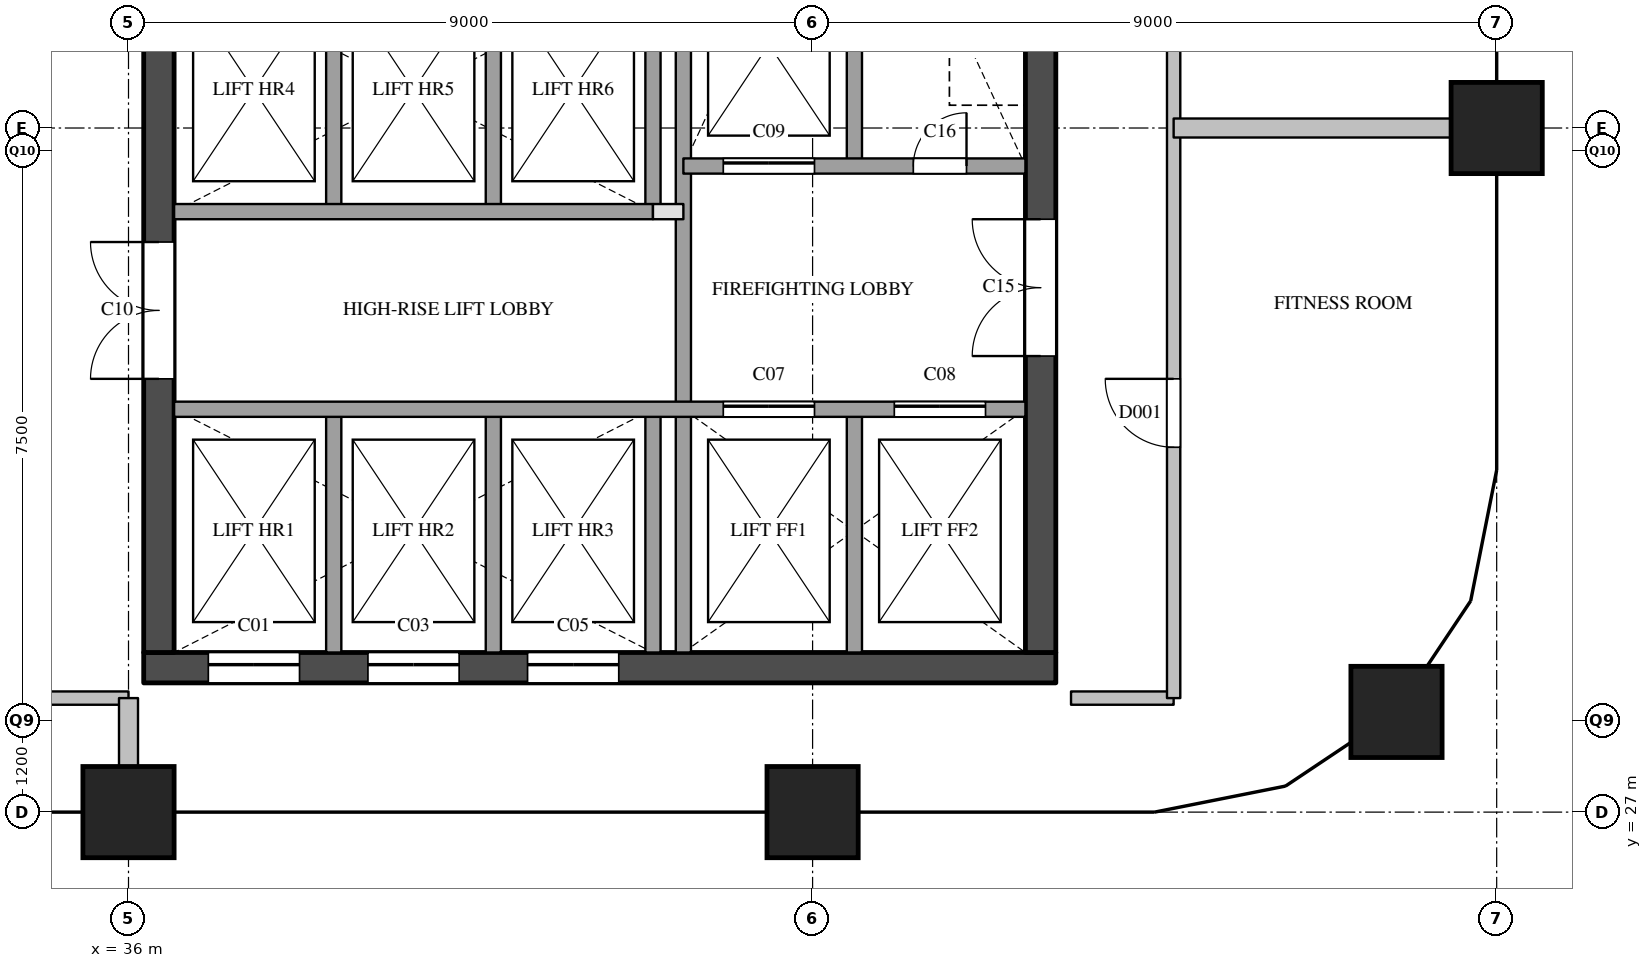
"""IFC4 building model, lengths in metres.
Left out: names, types, materials, properties, quantities, classifications, styles, units other than length and angle.
Written with IfcOpenShell. Run it as: python <this file> out.ifc"""

import sys

from ifc_helpers import new_model, si_unit, direction, frame, frame_2d, origin, origin_2d, place, context, subcontext, project, spatial, rectangle, extrude, element, fill, save


model = new_model("IFC4")
c1 = context("Model", 3, precision=1e-05, world=origin(), true_north=direction((0.0, 1.0)))
c2 = subcontext(c1, "Body", "Model", "MODEL_VIEW")
j1 = project(units=[si_unit("LENGTHUNIT", "METRE"), si_unit("PLANEANGLEUNIT", "RADIAN")], contexts=[c1])
p1 = place(None, origin())
s1 = spatial("IfcSite", under=j1, at=p1, CompositionType="ELEMENT")
p2 = place(p1, origin())
s2 = spatial("IfcBuilding", under=s1, at=p2, CompositionType="ELEMENT")
p3 = place(p2, frame((0.0, 0.0, 281.3)))
s3 = spatial("IfcBuildingStorey", under=s2, at=p3, CompositionType="ELEMENT", Elevation=281.3)
for number, where, z_axis, x_axis in (
    (1, (36.0, 27.0, 0.0), (0.0, 0.0, 1.0), (1.0, 0.0, 0.0)),
    (2, (45.0, 27.0, 0.0), (0.0, 0.0, 1.0), (1.0, 0.0, 0.0)),
    (3, (52.682, 28.318, 0.0), (0.0, 0.0, 1.0), (1.0, 0.0, 0.0)),
    (4, (54.0, 36.0, 0.0), (0.0, 0.0, 1.0), (1.0, 0.0, 0.0)),
):
    element("IfcColumn", number, at=place(p3, frame(where, z_axis=z_axis, x_axis=x_axis)), inside=s3, PredefinedType="COLUMN", context=c2, shape_type="SweptSolid", body=[
        extrude(rectangle(XDim=1.2, YDim=1.2, at=origin_2d()), origin(), (0.0, 0.0, 1.0), 3.9),
    ])
p4 = place(p3, frame((36.2, 28.9, 0.0), z_axis=(0.0, 0.0, 1.0), x_axis=(1.0, 0.0, 0.0)))
e5 = element("IfcWall", 5, at=p4, inside=s3, PredefinedType="SHEAR", context=c2, shape_type="SweptSolid", body=[
    extrude(rectangle(XDim=12.0, YDim=0.4, at=frame_2d((6.0, 0.0))), origin(), (0.0, 0.0, 1.0), 3.6),
])
p5 = place(p4, frame((0.85, 0.0, 0.0)))
e6 = element("IfcOpeningElement", 6, at=p5, cuts=e5, PredefinedType="OPENING", context=c2, shape_type="SweptSolid", body=[
    extrude(rectangle(XDim=1.2, YDim=2.1, at=frame_2d((0.6, 1.05))), frame((0.0, 0.21, 0.0), z_axis=(0.0, -1.0, 0.0), x_axis=(1.0, 0.0, 0.0)), (0.0, 0.0, 1.0), 0.42),
])
p6 = place(p4, frame((2.95, 0.0, 0.0)))
e7 = element("IfcOpeningElement", 7, at=p6, cuts=e5, PredefinedType="OPENING", context=c2, shape_type="SweptSolid", body=[
    extrude(rectangle(XDim=1.2, YDim=2.1, at=frame_2d((0.6, 1.05))), frame((0.0, 0.21, 0.0), z_axis=(0.0, -1.0, 0.0), x_axis=(1.0, 0.0, 0.0)), (0.0, 0.0, 1.0), 0.42),
])
p7 = place(p4, frame((5.05, 0.0, 0.0)))
e8 = element("IfcOpeningElement", 8, at=p7, cuts=e5, PredefinedType="OPENING", context=c2, shape_type="SweptSolid", body=[
    extrude(rectangle(XDim=1.2, YDim=2.1, at=frame_2d((0.6, 1.05))), frame((0.0, 0.21, 0.0), z_axis=(0.0, -1.0, 0.0), x_axis=(1.0, 0.0, 0.0)), (0.0, 0.0, 1.0), 0.42),
])
p8 = place(p3, frame((36.4, 29.1, 0.0), z_axis=(0.0, 0.0, 1.0), x_axis=(0.0, 1.0, 0.0)))
e9 = element("IfcWall", 9, at=p8, inside=s3, PredefinedType="SHEAR", context=c2, shape_type="SweptSolid", body=[
    extrude(rectangle(XDim=20.3, YDim=0.4, at=frame_2d((10.15, 0.0))), origin(), (0.0, 0.0, 1.0), 3.6),
])
p9 = place(p8, frame((3.6, 0.0, 0.0)))
e10 = element("IfcOpeningElement", 10, at=p9, cuts=e9, PredefinedType="OPENING", context=c2, shape_type="SweptSolid", body=[
    extrude(rectangle(XDim=1.8, YDim=2.1, at=frame_2d((0.9, 1.05))), frame((0.0, 0.21, 0.0), z_axis=(0.0, -1.0, 0.0), x_axis=(1.0, 0.0, 0.0)), (0.0, 0.0, 1.0), 0.42),
])
p10 = place(p8, frame((16.4, 0.0, 0.0)))
e11 = element("IfcOpeningElement", 11, at=p10, cuts=e9, PredefinedType="OPENING", context=c2, shape_type="SweptSolid", body=[
    extrude(rectangle(XDim=1.0, YDim=2.1, at=frame_2d((0.5, 1.05))), frame((0.0, 0.21, 0.0), z_axis=(0.0, -1.0, 0.0), x_axis=(1.0, 0.0, 0.0)), (0.0, 0.0, 1.0), 0.42),
])
p11 = place(p3, frame((48.0, 29.1, 0.0), z_axis=(0.0, 0.0, 1.0), x_axis=(0.0, 1.0, 0.0)))
e12 = element("IfcWall", 12, at=p11, inside=s3, PredefinedType="SHEAR", context=c2, shape_type="SweptSolid", body=[
    extrude(rectangle(XDim=20.3, YDim=0.4, at=frame_2d((10.15, 0.0))), origin(), (0.0, 0.0, 1.0), 3.6),
])
p12 = place(p11, frame((12.5, 0.0, 0.0)))
e13 = element("IfcOpeningElement", 13, at=p12, cuts=e12, PredefinedType="OPENING", context=c2, shape_type="SweptSolid", body=[
    extrude(rectangle(XDim=0.7, YDim=2.1, at=frame_2d((0.35, 1.05))), frame((0.0, 0.21, 0.0), z_axis=(0.0, -1.0, 0.0), x_axis=(1.0, 0.0, 0.0)), (0.0, 0.0, 1.0), 0.42),
])
p13 = place(p11, frame((3.9, 0.0, 0.0)))
e14 = element("IfcOpeningElement", 14, at=p13, cuts=e12, PredefinedType="OPENING", context=c2, shape_type="SweptSolid", body=[
    extrude(rectangle(XDim=1.8, YDim=2.1, at=frame_2d((0.9, 1.05))), frame((0.0, 0.21, 0.0), z_axis=(0.0, -1.0, 0.0), x_axis=(1.0, 0.0, 0.0)), (0.0, 0.0, 1.0), 0.42),
])
p14 = place(p3, frame((38.7, 29.1, 0.0), z_axis=(0.0, 0.0, 1.0), x_axis=(0.0, 1.0, 0.0)))
e15 = element("IfcWall", 15, at=p14, inside=s3, PredefinedType="SOLIDWALL", context=c2, shape_type="SweptSolid", body=[
    extrude(rectangle(XDim=3.2, YDim=0.2, at=frame_2d((1.6, 0.0))), origin(), (0.0, 0.0, 1.0), 3.6),
])
p15 = place(p3, frame((38.7, 34.9, 0.0), z_axis=(0.0, 0.0, 1.0), x_axis=(0.0, 1.0, 0.0)))
e16 = element("IfcWall", 16, at=p15, inside=s3, PredefinedType="SOLIDWALL", context=c2, shape_type="SweptSolid", body=[
    extrude(rectangle(XDim=3.2, YDim=0.2, at=frame_2d((1.6, 0.0))), origin(), (0.0, 0.0, 1.0), 3.6),
])
p16 = place(p3, frame((40.8, 29.1, 0.0), z_axis=(0.0, 0.0, 1.0), x_axis=(0.0, 1.0, 0.0)))
e17 = element("IfcWall", 17, at=p16, inside=s3, PredefinedType="SOLIDWALL", context=c2, shape_type="SweptSolid", body=[
    extrude(rectangle(XDim=3.2, YDim=0.2, at=frame_2d((1.6, 0.0))), origin(), (0.0, 0.0, 1.0), 3.6),
])
p17 = place(p3, frame((40.8, 34.9, 0.0), z_axis=(0.0, 0.0, 1.0), x_axis=(0.0, 1.0, 0.0)))
e18 = element("IfcWall", 18, at=p17, inside=s3, PredefinedType="SOLIDWALL", context=c2, shape_type="SweptSolid", body=[
    extrude(rectangle(XDim=3.2, YDim=0.2, at=frame_2d((1.6, 0.0))), origin(), (0.0, 0.0, 1.0), 3.6),
])
p18 = place(p3, frame((42.9, 29.1, 0.0), z_axis=(0.0, 0.0, 1.0), x_axis=(0.0, 1.0, 0.0)))
e19 = element("IfcWall", 19, at=p18, inside=s3, PredefinedType="SOLIDWALL", context=c2, shape_type="SweptSolid", body=[
    extrude(rectangle(XDim=3.2, YDim=0.2, at=frame_2d((1.6, 0.0))), origin(), (0.0, 0.0, 1.0), 3.6),
])
p19 = place(p3, frame((42.9, 34.9, 0.0), z_axis=(0.0, 0.0, 1.0), x_axis=(0.0, 1.0, 0.0)))
e20 = element("IfcWall", 20, at=p19, inside=s3, PredefinedType="SOLIDWALL", context=c2, shape_type="SweptSolid", body=[
    extrude(rectangle(XDim=3.2, YDim=0.2, at=frame_2d((1.6, 0.0))), origin(), (0.0, 0.0, 1.0), 3.6),
])
p20 = place(p3, frame((43.3, 29.1, 0.0), z_axis=(0.0, 0.0, 1.0), x_axis=(0.0, 1.0, 0.0)))
e21 = element("IfcWall", 21, at=p20, inside=s3, PredefinedType="SOLIDWALL", context=c2, shape_type="SweptSolid", body=[
    extrude(rectangle(XDim=9.9, YDim=0.2, at=frame_2d((4.95, 0.0))), origin(), (0.0, 0.0, 1.0), 3.6),
])
for number, where, z_axis, x_axis in (
    (22, (45.55, 29.1, 0.0), (0.0, 0.0, 1.0), (0.0, 1.0, 0.0)),
    (23, (45.55, 35.5, 0.0), (0.0, 0.0, 1.0), (0.0, 1.0, 0.0)),
):
    element("IfcWall", number, at=place(p3, frame(where, z_axis=z_axis, x_axis=x_axis)), inside=s3, PredefinedType="SOLIDWALL", context=c2, shape_type="SweptSolid", body=[
        extrude(rectangle(XDim=3.2, YDim=0.2, at=frame_2d((1.6, 0.0))), origin(), (0.0, 0.0, 1.0), 3.6),
    ])
p21 = place(p3, frame((36.6, 32.3, 0.0), z_axis=(0.0, 0.0, 1.0), x_axis=(1.0, 0.0, 0.0)))
e24 = element("IfcWall", 24, at=p21, inside=s3, PredefinedType="SOLIDWALL", context=c2, shape_type="SweptSolid", body=[
    extrude(rectangle(XDim=11.2, YDim=0.2, at=frame_2d((5.6, 0.0))), origin(), (0.0, 0.0, 1.0), 3.6),
])
p22 = place(p21, frame((7.225, 0.0, 0.0)))
e25 = element("IfcOpeningElement", 25, at=p22, cuts=e24, PredefinedType="OPENING", context=c2, shape_type="SweptSolid", body=[
    extrude(rectangle(XDim=1.2, YDim=2.1, at=frame_2d((0.6, 1.05))), frame((0.0, 0.11, 0.0), z_axis=(0.0, -1.0, 0.0), x_axis=(1.0, 0.0, 0.0)), (0.0, 0.0, 1.0), 0.22),
])
p23 = place(p21, frame((9.475, 0.0, 0.0)))
e26 = element("IfcOpeningElement", 26, at=p23, cuts=e24, PredefinedType="OPENING", context=c2, shape_type="SweptSolid", body=[
    extrude(rectangle(XDim=1.2, YDim=2.1, at=frame_2d((0.6, 1.05))), frame((0.0, 0.11, 0.0), z_axis=(0.0, -1.0, 0.0), x_axis=(1.0, 0.0, 0.0)), (0.0, 0.0, 1.0), 0.22),
])
p24 = place(p3, frame((42.9, 34.9, 0.0), z_axis=(0.0, 0.0, 1.0), x_axis=(1.0, 0.0, 0.0)))
e27 = element("IfcWall", 27, at=p24, inside=s3, PredefinedType="PARTITIONING", context=c2, shape_type="SweptSolid", body=[
    extrude(rectangle(XDim=0.4, YDim=0.2, at=frame_2d((0.2, 0.0))), origin(), (0.0, 0.0, 1.0), 3.6),
])
p25 = place(p3, frame((36.6, 34.9, 0.0), z_axis=(0.0, 0.0, 1.0), x_axis=(1.0, 0.0, 0.0)))
e28 = element("IfcWall", 28, at=p25, inside=s3, PredefinedType="SOLIDWALL", context=c2, shape_type="SweptSolid", body=[
    extrude(rectangle(XDim=6.3, YDim=0.2, at=frame_2d((3.15, 0.0))), origin(), (0.0, 0.0, 1.0), 3.6),
])
p26 = place(p3, frame((43.3, 35.5, 0.0), z_axis=(0.0, 0.0, 1.0), x_axis=(1.0, 0.0, 0.0)))
e29 = element("IfcWall", 29, at=p26, inside=s3, PredefinedType="SOLIDWALL", context=c2, shape_type="SweptSolid", body=[
    extrude(rectangle(XDim=4.5, YDim=0.2, at=frame_2d((2.25, 0.0))), origin(), (0.0, 0.0, 1.0), 3.6),
])
p27 = place(p26, frame((0.525, 0.0, 0.0)))
e30 = element("IfcOpeningElement", 30, at=p27, cuts=e29, PredefinedType="OPENING", context=c2, shape_type="SweptSolid", body=[
    extrude(rectangle(XDim=1.2, YDim=2.1, at=frame_2d((0.6, 1.05))), frame((0.0, 0.11, 0.0), z_axis=(0.0, -1.0, 0.0), x_axis=(1.0, 0.0, 0.0)), (0.0, 0.0, 1.0), 0.22),
])
p28 = place(p26, frame((3.025, 0.0, 0.0)))
e31 = element("IfcOpeningElement", 31, at=p28, cuts=e29, PredefinedType="OPENING", context=c2, shape_type="SweptSolid", body=[
    extrude(rectangle(XDim=0.7, YDim=2.1, at=frame_2d((0.35, 1.05))), frame((0.0, 0.11, 0.0), z_axis=(0.0, -1.0, 0.0), x_axis=(1.0, 0.0, 0.0)), (0.0, 0.0, 1.0), 0.22),
])
for number, where, z_axis, x_axis in (
    (32, (34.65, 28.5, 0.0), (0.0, 0.0, 1.0), (1.0, 0.0, 0.0)),
    (33, (48.4, 28.5, 0.0), (0.0, 0.0, 1.0), (1.0, 0.0, 0.0)),
):
    element("IfcWall", number, at=place(p3, frame(where, z_axis=z_axis, x_axis=x_axis)), inside=s3, PredefinedType="PARTITIONING", context=c2, shape_type="SweptSolid", body=[
        extrude(rectangle(XDim=1.35, YDim=0.175, at=frame_2d((0.675, 0.0))), origin(), (0.0, 0.0, 1.0), 3.6),
    ])
p29 = place(p3, frame((49.75, 28.5, 0.0), z_axis=(0.0, 0.0, 1.0), x_axis=(0.0, 1.0, 0.0)))
e34 = element("IfcWall", 34, at=p29, inside=s3, PredefinedType="PARTITIONING", context=c2, shape_type="SweptSolid", body=[
    extrude(rectangle(XDim=22.85, YDim=0.175, at=frame_2d((11.425, 0.0))), origin(), (0.0, 0.0, 1.0), 3.6),
])
p30 = place(p29, frame((3.3, 0.0, 0.0)))
e35 = element("IfcOpeningElement", 35, at=p30, cuts=e34, PredefinedType="OPENING", context=c2, shape_type="SweptSolid", body=[
    extrude(rectangle(XDim=0.9, YDim=2.1, at=frame_2d((0.45, 1.05))), frame((0.0, 0.097, 0.0), z_axis=(0.0, -1.0, 0.0), x_axis=(1.0, 0.0, 0.0)), (0.0, 0.0, 1.0), 0.195),
])
p31 = place(p29, frame((12.45, 0.0, 0.0)))
e36 = element("IfcOpeningElement", 36, at=p31, cuts=e34, PredefinedType="OPENING", context=c2, shape_type="SweptSolid", body=[
    extrude(rectangle(XDim=0.9, YDim=2.1, at=frame_2d((0.45, 1.05))), frame((0.0, 0.097, 0.0), z_axis=(0.0, -1.0, 0.0), x_axis=(1.0, 0.0, 0.0)), (0.0, 0.0, 1.0), 0.195),
])
p32 = place(p29, frame((20.125, 0.0, 0.0)))
e37 = element("IfcOpeningElement", 37, at=p32, cuts=e34, PredefinedType="OPENING", context=c2, shape_type="SweptSolid", body=[
    extrude(rectangle(XDim=0.9, YDim=2.1, at=frame_2d((0.45, 1.05))), frame((0.0, 0.097, 0.0), z_axis=(0.0, -1.0, 0.0), x_axis=(1.0, 0.0, 0.0)), (0.0, 0.0, 1.0), 0.195),
])
p33 = place(p3, frame((49.75, 36.0, 0.0), z_axis=(0.0, 0.0, 1.0), x_axis=(1.0, 0.0, 0.0)))
e38 = element("IfcWall", 38, at=p33, inside=s3, PredefinedType="PARTITIONING", context=c2, shape_type="SweptSolid", body=[
    extrude(rectangle(XDim=4.25, YDim=0.25, at=frame_2d((2.125, 0.0))), origin(), (0.0, 0.0, 1.0), 3.6),
])
p34 = place(p3, frame((36.0, 27.0, 0.0), z_axis=(0.0, 0.0, 1.0), x_axis=(0.0, 1.0, 0.0)))
e39 = element("IfcWall", 39, at=p34, inside=s3, PredefinedType="PARTITIONING", context=c2, shape_type="SweptSolid", body=[
    extrude(rectangle(XDim=1.5, YDim=0.25, at=frame_2d((0.75, 0.0))), origin(), (0.0, 0.0, 1.0), 3.6),
])
p35 = place(p5, origin())
e40 = element("IfcDoor", 40, at=p35, inside=s3, OperationType="SLIDING_TO_LEFT", PredefinedType="DOOR", context=c2, shape_type="SweptSolid", body=[
    extrude(rectangle(XDim=1.2, YDim=2.1, at=frame_2d((0.6, 1.05))), frame((0.0, 0.025, 0.0), z_axis=(0.0, -1.0, 0.0), x_axis=(1.0, 0.0, 0.0)), (0.0, 0.0, 1.0), 0.05),
])
fill(e6, e40)
p36 = place(p6, origin())
e41 = element("IfcDoor", 41, at=p36, inside=s3, OperationType="SLIDING_TO_LEFT", PredefinedType="DOOR", context=c2, shape_type="SweptSolid", body=[
    extrude(rectangle(XDim=1.2, YDim=2.1, at=frame_2d((0.6, 1.05))), frame((0.0, 0.025, 0.0), z_axis=(0.0, -1.0, 0.0), x_axis=(1.0, 0.0, 0.0)), (0.0, 0.0, 1.0), 0.05),
])
fill(e7, e41)
p37 = place(p7, origin())
e42 = element("IfcDoor", 42, at=p37, inside=s3, OperationType="SLIDING_TO_LEFT", PredefinedType="DOOR", context=c2, shape_type="SweptSolid", body=[
    extrude(rectangle(XDim=1.2, YDim=2.1, at=frame_2d((0.6, 1.05))), frame((0.0, 0.025, 0.0), z_axis=(0.0, -1.0, 0.0), x_axis=(1.0, 0.0, 0.0)), (0.0, 0.0, 1.0), 0.05),
])
fill(e8, e42)
p38 = place(p22, origin())
e43 = element("IfcDoor", 43, at=p38, inside=s3, OperationType="SLIDING_TO_LEFT", PredefinedType="DOOR", context=c2, shape_type="SweptSolid", body=[
    extrude(rectangle(XDim=1.2, YDim=2.1, at=frame_2d((0.6, 1.05))), frame((0.0, 0.025, 0.0), z_axis=(0.0, -1.0, 0.0), x_axis=(1.0, 0.0, 0.0)), (0.0, 0.0, 1.0), 0.05),
])
fill(e25, e43)
p39 = place(p23, origin())
e44 = element("IfcDoor", 44, at=p39, inside=s3, OperationType="SLIDING_TO_LEFT", PredefinedType="DOOR", context=c2, shape_type="SweptSolid", body=[
    extrude(rectangle(XDim=1.2, YDim=2.1, at=frame_2d((0.6, 1.05))), frame((0.0, 0.025, 0.0), z_axis=(0.0, -1.0, 0.0), x_axis=(1.0, 0.0, 0.0)), (0.0, 0.0, 1.0), 0.05),
])
fill(e26, e44)
p40 = place(p27, origin())
e45 = element("IfcDoor", 45, at=p40, inside=s3, OperationType="SLIDING_TO_LEFT", PredefinedType="DOOR", context=c2, shape_type="SweptSolid", body=[
    extrude(rectangle(XDim=1.2, YDim=2.1, at=frame_2d((0.6, 1.05))), frame((0.0, 0.025, 0.0), z_axis=(0.0, -1.0, 0.0), x_axis=(1.0, 0.0, 0.0)), (0.0, 0.0, 1.0), 0.05),
])
fill(e30, e45)
p41 = place(p9, origin())
e46 = element("IfcDoor", 46, at=p41, inside=s3, OperationType="DOUBLE_DOOR_SINGLE_SWING", PredefinedType="DOOR", context=c2, shape_type="SweptSolid", body=[
    extrude(rectangle(XDim=1.8, YDim=2.1, at=frame_2d((0.9, 1.05))), frame((0.0, 0.025, 0.0), z_axis=(0.0, -1.0, 0.0), x_axis=(1.0, 0.0, 0.0)), (0.0, 0.0, 1.0), 0.05),
])
fill(e10, e46)
p42 = place(p13, origin())
e47 = element("IfcDoor", 47, at=p42, inside=s3, OperationType="DOUBLE_DOOR_SINGLE_SWING", PredefinedType="DOOR", context=c2, shape_type="SweptSolid", body=[
    extrude(rectangle(XDim=1.8, YDim=2.1, at=frame_2d((0.9, 1.05))), frame((0.0, 0.025, 0.0), z_axis=(0.0, -1.0, 0.0), x_axis=(1.0, 0.0, 0.0)), (0.0, 0.0, 1.0), 0.05),
])
fill(e14, e47)
p43 = place(p28, origin())
e48 = element("IfcDoor", 48, at=p43, inside=s3, OperationType="SINGLE_SWING_RIGHT", PredefinedType="DOOR", context=c2, shape_type="SweptSolid", body=[
    extrude(rectangle(XDim=0.7, YDim=2.1, at=frame_2d((0.35, 1.05))), frame((0.0, 0.025, 0.0), z_axis=(0.0, -1.0, 0.0), x_axis=(1.0, 0.0, 0.0)), (0.0, 0.0, 1.0), 0.05),
])
fill(e31, e48)
p44 = place(p30, origin())
e49 = element("IfcDoor", 49, at=p44, inside=s3, OperationType="SINGLE_SWING_RIGHT", PredefinedType="DOOR", context=c2, shape_type="SweptSolid", body=[
    extrude(rectangle(XDim=0.9, YDim=2.1, at=frame_2d((0.45, 1.05))), frame((0.0, 0.025, 0.0), z_axis=(0.0, -1.0, 0.0), x_axis=(1.0, 0.0, 0.0)), (0.0, 0.0, 1.0), 0.05),
])
fill(e35, e49)
save(model, sys.argv[1])
